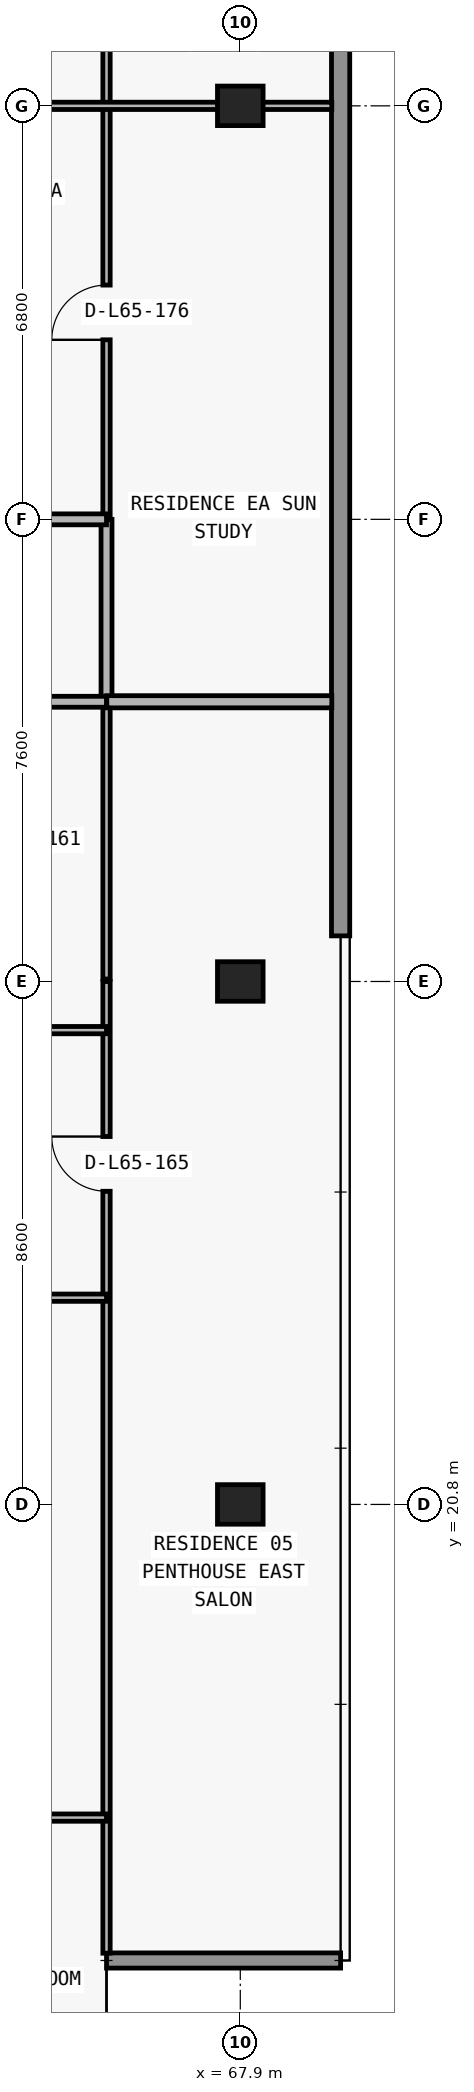
"""IFC4 building model, lengths in metres.
Left out: names, types, materials, properties, quantities, classifications, styles, units other than length and angle.
Written with IfcOpenShell. Run it as: python <this file> out.ifc"""

import sys

from ifc_helpers import new_model, si_unit, direction, frame, frame_2d, origin, origin_2d, place, context, subcontext, project, spatial, rectangle, extrude, element, fill, save


model = new_model("IFC4")
c1 = context("Model", 3, precision=1e-05, world=origin(), true_north=direction((0.0, 1.0)))
c2 = subcontext(c1, "Body", "Model", "MODEL_VIEW")
j1 = project(units=[si_unit("LENGTHUNIT", "METRE"), si_unit("PLANEANGLEUNIT", "RADIAN")], contexts=[c1])
p1 = place(None, origin())
s1 = spatial("IfcSite", under=j1, at=p1, CompositionType="ELEMENT")
p2 = place(p1, origin())
s2 = spatial("IfcBuilding", under=s1, at=p2, CompositionType="ELEMENT")
p3 = place(p2, frame((0.0, 0.0, 233.1)))
s3 = spatial("IfcBuildingStorey", under=s2, at=p3, CompositionType="ELEMENT", Elevation=233.1)
for number, where, z_axis, x_axis in (
    (1, (67.9, 20.8, 0.0), (0.0, 0.0, 1.0), (1.0, 0.0, 0.0)),
    (2, (67.9, 29.4, 0.0), (0.0, 0.0, 1.0), (1.0, 0.0, 0.0)),
    (3, (67.9, 43.8, 0.0), (0.0, 0.0, 1.0), (1.0, 0.0, 0.0)),
):
    element("IfcColumn", number, at=place(p3, frame(where, z_axis=z_axis, x_axis=x_axis)), inside=s3, PredefinedType="COLUMN", context=c2, shape_type="SweptSolid", body=[
        extrude(rectangle(XDim=0.75, YDim=0.65, at=origin_2d()), origin(), (0.0, 0.0, 1.0), 3.05),
    ])
p4 = place(p3, frame((65.7, 13.3, 0.0), z_axis=(0.0, 0.0, 1.0), x_axis=(1.0, 0.0, 0.0)))
e4 = element("IfcWall", 4, at=p4, inside=s3, PredefinedType="ELEMENTEDWALL", context=c2, shape_type="SweptSolid", body=[
    extrude(rectangle(XDim=3.85, YDim=0.25, at=frame_2d((1.925, 0.0))), origin(), (0.0, 0.0, 1.0), 3.05),
])
p5 = place(p3, frame((69.55, 47.0, 0.0), z_axis=(0.0, 0.0, 1.0), x_axis=(0.0, -1.0, 0.0)))
e5 = element("IfcWall", 5, at=p5, inside=s3, PredefinedType="STANDARD", context=c2, shape_type="SweptSolid", body=[
    extrude(rectangle(XDim=16.85, YDim=0.3, at=frame_2d((8.425, 0.0))), origin(), (0.0, 0.0, 1.0), 3.05),
])
p6 = place(p3, frame((65.7, 13.42, 0.0), z_axis=(0.0, 0.0, 1.0), x_axis=(0.0, 1.0, 0.0)))
e6 = element("IfcWall", 6, at=p6, inside=s3, PredefinedType="PARTITIONING", context=c2, shape_type="SweptSolid", body=[
    extrude(rectangle(XDim=15.98, YDim=0.12, at=frame_2d((7.99, 0.0))), origin(), (0.0, 0.0, 1.0), 2.629),
])
p7 = place(p6, frame((12.53, 0.0, 0.0)))
e7 = element("IfcOpeningElement", 7, at=p7, cuts=e6, PredefinedType="OPENING", context=c2, shape_type="SweptSolid", body=[
    extrude(rectangle(XDim=0.9, YDim=2.15, at=frame_2d((0.45, 1.075))), frame((0.0, 0.07, 0.0), z_axis=(0.0, -1.0, 0.0), x_axis=(1.0, 0.0, 0.0)), (0.0, 0.0, 1.0), 0.14),
])
p8 = place(p3, frame((65.7, 29.44, 0.0), z_axis=(0.0, 0.0, 1.0), x_axis=(0.0, 1.0, 0.0)))
e8 = element("IfcWall", 8, at=p8, inside=s3, PredefinedType="PARTITIONING", context=c2, shape_type="SweptSolid", body=[
    extrude(rectangle(XDim=4.56, YDim=0.12, at=frame_2d((2.28, 0.0))), origin(), (0.0, 0.0, 1.0), 2.629),
])
p9 = place(p3, frame((65.7, 34.005, 0.0), z_axis=(0.0, 0.0, 1.0), x_axis=(0.0, 1.0, 0.0)))
e9 = element("IfcWall", 9, at=p9, inside=s3, PredefinedType="PARTITIONING", context=c2, shape_type="SweptSolid", body=[
    extrude(rectangle(XDim=2.995, YDim=0.18, at=frame_2d((1.498, 0.0))), origin(), (0.0, 0.0, 1.0), 2.629),
])
p10 = place(p3, frame((65.7, 37.005, 0.0), z_axis=(0.0, 0.0, 1.0), x_axis=(0.0, 1.0, 0.0)))
e10 = element("IfcWall", 10, at=p10, inside=s3, PredefinedType="PARTITIONING", context=c2, shape_type="SweptSolid", body=[
    extrude(rectangle(XDim=9.875, YDim=0.12, at=frame_2d((4.938, 0.0))), origin(), (0.0, 0.0, 1.0), 2.629),
])
p11 = place(p10, frame((2.948, 0.0, 0.0)))
e11 = element("IfcOpeningElement", 11, at=p11, cuts=e10, PredefinedType="OPENING", context=c2, shape_type="SweptSolid", body=[
    extrude(rectangle(XDim=0.9, YDim=2.15, at=frame_2d((0.45, 1.075))), frame((0.0, 0.07, 0.0), z_axis=(0.0, -1.0, 0.0), x_axis=(1.0, 0.0, 0.0)), (0.0, 0.0, 1.0), 0.14),
])
p12 = place(p10, frame((7.885, 0.0, 0.0)))
e12 = element("IfcOpeningElement", 12, at=p12, cuts=e10, PredefinedType="OPENING", context=c2, shape_type="SweptSolid", body=[
    extrude(rectangle(XDim=0.9, YDim=2.15, at=frame_2d((0.45, 1.075))), frame((0.0, 0.07, 0.0), z_axis=(0.0, -1.0, 0.0), x_axis=(1.0, 0.0, 0.0)), (0.0, 0.0, 1.0), 0.14),
])
p13 = place(p3, frame((59.5, 15.65, 0.0), z_axis=(0.0, 0.0, 1.0), x_axis=(1.0, 0.0, 0.0)))
e13 = element("IfcWall", 13, at=p13, inside=s3, PredefinedType="PARTITIONING", context=c2, shape_type="SweptSolid", body=[
    extrude(rectangle(XDim=6.2, YDim=0.12, at=frame_2d((3.1, 0.0))), origin(), (0.0, 0.0, 1.0), 3.05),
])
p14 = place(p13, frame((2.65, 0.0, 0.0)))
e14 = element("IfcOpeningElement", 14, at=p14, cuts=e13, PredefinedType="OPENING", context=c2, shape_type="SweptSolid", body=[
    extrude(rectangle(XDim=0.9, YDim=2.15, at=frame_2d((0.45, 1.075))), frame((0.0, 0.07, 0.0), z_axis=(0.0, -1.0, 0.0), x_axis=(1.0, 0.0, 0.0)), (0.0, 0.0, 1.0), 0.14),
])
p15 = place(p3, frame((59.505, 24.2, 0.0), z_axis=(0.0, 0.0, 1.0), x_axis=(1.0, 0.0, 0.0)))
e15 = element("IfcWall", 15, at=p15, inside=s3, PredefinedType="PARTITIONING", context=c2, shape_type="SweptSolid", body=[
    extrude(rectangle(XDim=6.195, YDim=0.12, at=frame_2d((3.098, 0.0))), origin(), (0.0, 0.0, 1.0), 3.05),
])
p16 = place(p15, frame((2.647, 0.0, 0.0)))
e16 = element("IfcOpeningElement", 16, at=p16, cuts=e15, PredefinedType="OPENING", context=c2, shape_type="SweptSolid", body=[
    extrude(rectangle(XDim=0.9, YDim=2.15, at=frame_2d((0.45, 1.075))), frame((0.0, 0.07, 0.0), z_axis=(0.0, -1.0, 0.0), x_axis=(1.0, 0.0, 0.0)), (0.0, 0.0, 1.0), 0.14),
])
p17 = place(p3, frame((59.5, 28.6, 0.0), z_axis=(0.0, 0.0, 1.0), x_axis=(1.0, 0.0, 0.0)))
e17 = element("IfcWall", 17, at=p17, inside=s3, PredefinedType="PARTITIONING", context=c2, shape_type="SweptSolid", body=[
    extrude(rectangle(XDim=6.2, YDim=0.12, at=frame_2d((3.1, 0.0))), origin(), (0.0, 0.0, 1.0), 3.05),
])
p18 = place(p17, frame((1.761, 0.0, 0.0)))
e18 = element("IfcOpeningElement", 18, at=p18, cuts=e17, PredefinedType="OPENING", context=c2, shape_type="SweptSolid", body=[
    extrude(rectangle(XDim=0.9, YDim=2.15, at=frame_2d((0.45, 1.075))), frame((0.0, 0.07, 0.0), z_axis=(0.0, -1.0, 0.0), x_axis=(1.0, 0.0, 0.0)), (0.0, 0.0, 1.0), 0.14),
])
p19 = place(p3, frame((31.4, 34.0, 0.0), z_axis=(0.0, 0.0, 1.0), x_axis=(1.0, 0.0, 0.0)))
e19 = element("IfcWall", 19, at=p19, inside=s3, PredefinedType="PARTITIONING", context=c2, shape_type="SweptSolid", body=[
    extrude(rectangle(XDim=34.3, YDim=0.18, at=frame_2d((17.15, 0.0))), origin(), (0.0, 0.0, 1.0), 3.05),
])
p20 = place(p19, frame((5.948, 0.0, 0.0)))
e20 = element("IfcOpeningElement", 20, at=p20, cuts=e19, PredefinedType="OPENING", context=c2, shape_type="SweptSolid", body=[
    extrude(rectangle(XDim=1.0, YDim=2.2, at=frame_2d((0.5, 1.1))), frame((0.0, 0.1, 0.0), z_axis=(0.0, -1.0, 0.0), x_axis=(1.0, 0.0, 0.0)), (0.0, 0.0, 1.0), 0.2),
])
p21 = place(p19, frame((13.796, 0.0, 0.0)))
e21 = element("IfcOpeningElement", 21, at=p21, cuts=e19, PredefinedType="OPENING", context=c2, shape_type="SweptSolid", body=[
    extrude(rectangle(XDim=1.0, YDim=2.2, at=frame_2d((0.5, 1.1))), frame((0.0, 0.1, 0.0), z_axis=(0.0, -1.0, 0.0), x_axis=(1.0, 0.0, 0.0)), (0.0, 0.0, 1.0), 0.2),
])
p22 = place(p19, frame((22.409, 0.0, 0.0)))
e22 = element("IfcOpeningElement", 22, at=p22, cuts=e19, PredefinedType="OPENING", context=c2, shape_type="SweptSolid", body=[
    extrude(rectangle(XDim=1.0, YDim=2.2, at=frame_2d((0.5, 1.1))), frame((0.0, 0.1, 0.0), z_axis=(0.0, -1.0, 0.0), x_axis=(1.0, 0.0, 0.0)), (0.0, 0.0, 1.0), 0.2),
])
p23 = place(p3, frame((65.705, 34.0, 0.0), z_axis=(0.0, 0.0, 1.0), x_axis=(1.0, 0.0, 0.0)))
e23 = element("IfcWall", 23, at=p23, inside=s3, PredefinedType="PARTITIONING", context=c2, shape_type="SweptSolid", body=[
    extrude(rectangle(XDim=3.7, YDim=0.2, at=frame_2d((1.85, 0.0))), origin(), (0.0, 0.0, 1.0), 3.05),
])
p24 = place(p3, frame((59.855, 37.0, 0.0), z_axis=(0.0, 0.0, 1.0), x_axis=(1.0, 0.0, 0.0)))
e24 = element("IfcWall", 24, at=p24, inside=s3, PredefinedType="PARTITIONING", context=c2, shape_type="SweptSolid", body=[
    extrude(rectangle(XDim=5.845, YDim=0.18, at=frame_2d((2.922, 0.0))), origin(), (0.0, 0.0, 1.0), 3.05),
])
p25 = place(p24, frame((3.57, 0.0, 0.0)))
e25 = element("IfcOpeningElement", 25, at=p25, cuts=e24, PredefinedType="OPENING", context=c2, shape_type="SweptSolid", body=[
    extrude(rectangle(XDim=1.0, YDim=2.2, at=frame_2d((0.5, 1.1))), frame((0.0, 0.1, 0.0), z_axis=(0.0, -1.0, 0.0), x_axis=(1.0, 0.0, 0.0)), (0.0, 0.0, 1.0), 0.2),
])
p26 = place(p3, frame((59.845, 43.8, 0.0), z_axis=(0.0, 0.0, 1.0), x_axis=(1.0, 0.0, 0.0)))
e26 = element("IfcWall", 26, at=p26, inside=s3, PredefinedType="PARTITIONING", context=c2, shape_type="SweptSolid", body=[
    extrude(rectangle(XDim=9.56, YDim=0.12, at=frame_2d((4.78, 0.0))), origin(), (0.0, 0.0, 1.0), 2.418),
])
p27 = place(p26, frame((3.63, 0.0, 0.0)))
e27 = element("IfcOpeningElement", 27, at=p27, cuts=e26, PredefinedType="OPENING", context=c2, shape_type="SweptSolid", body=[
    extrude(rectangle(XDim=0.9, YDim=2.15, at=frame_2d((0.45, 1.075))), frame((0.0, 0.07, 0.0), z_axis=(0.0, -1.0, 0.0), x_axis=(1.0, 0.0, 0.0)), (0.0, 0.0, 1.0), 0.14),
])
p28 = place(p26, frame((0.728, 0.0, 0.0)))
e28 = element("IfcOpeningElement", 28, at=p28, cuts=e26, PredefinedType="OPENING", context=c2, shape_type="SweptSolid", body=[
    extrude(rectangle(XDim=0.85, YDim=2.1, at=frame_2d((0.425, 1.05))), frame((0.0, 0.07, 0.0), z_axis=(0.0, -1.0, 0.0), x_axis=(1.0, 0.0, 0.0)), (0.0, 0.0, 1.0), 0.14),
])
p29 = place(p7, origin())
e29 = element("IfcDoor", 29, at=p29, inside=s3, OperationType="SINGLE_SWING_RIGHT", PredefinedType="DOOR", context=c2, shape_type="SweptSolid", body=[
    extrude(rectangle(XDim=0.9, YDim=2.15, at=frame_2d((0.45, 1.075))), frame((0.0, 0.025, 0.0), z_axis=(0.0, -1.0, 0.0), x_axis=(1.0, 0.0, 0.0)), (0.0, 0.0, 1.0), 0.05),
])
fill(e7, e29)
p30 = place(p11, origin())
e30 = element("IfcDoor", 30, at=p30, inside=s3, OperationType="SINGLE_SWING_LEFT", PredefinedType="DOOR", context=c2, shape_type="SweptSolid", body=[
    extrude(rectangle(XDim=0.9, YDim=2.15, at=frame_2d((0.45, 1.075))), frame((0.0, 0.025, 0.0), z_axis=(0.0, -1.0, 0.0), x_axis=(1.0, 0.0, 0.0)), (0.0, 0.0, 1.0), 0.05),
])
fill(e11, e30)
save(model, sys.argv[1])
